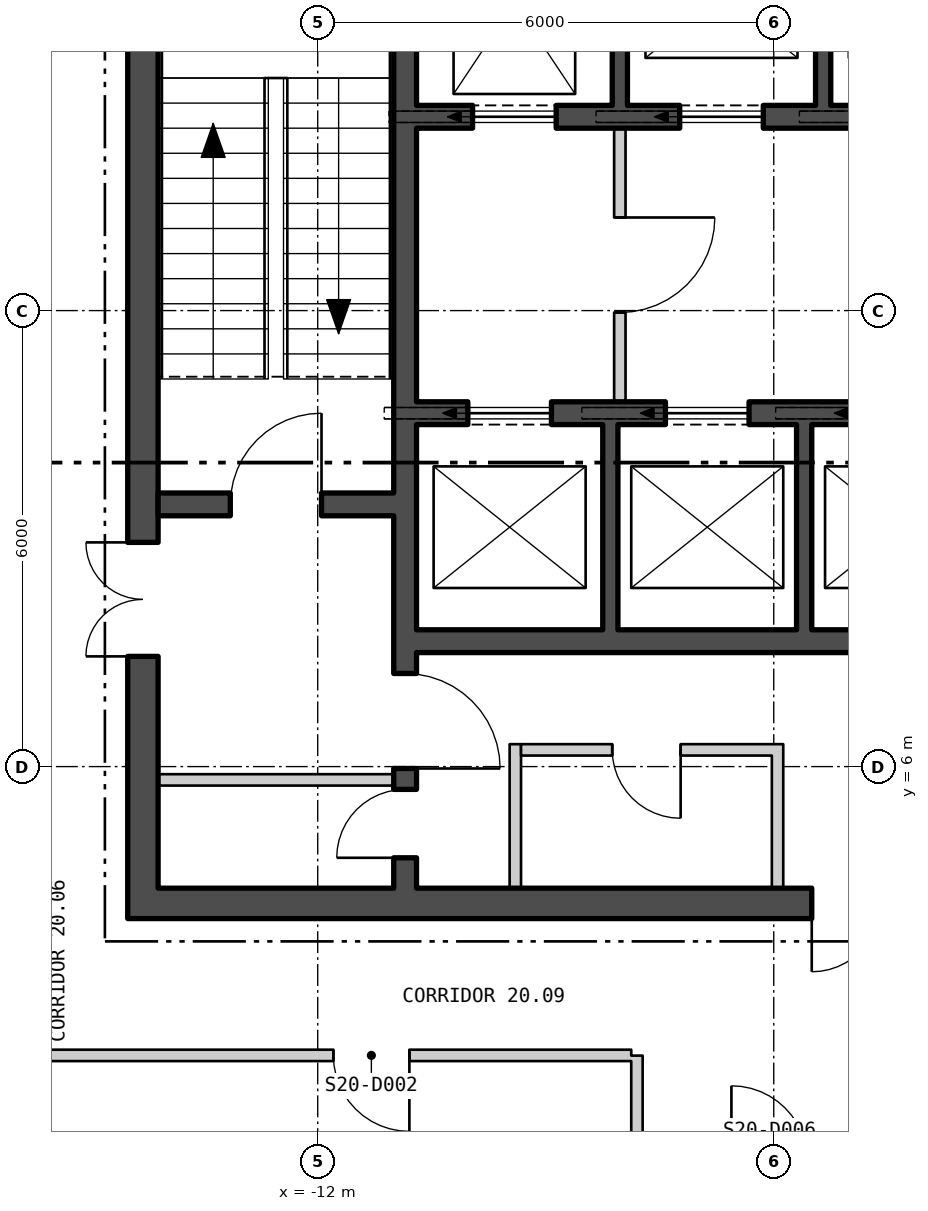
"""IFC4 building model, lengths in metres.
Left out: names, types, materials, properties, quantities, classifications, styles, units other than length and angle.
Written with IfcOpenShell. Run it as: python <this file> out.ifc"""

import sys

from ifc_helpers import new_model, si_unit, direction, frame, frame_2d, origin, place, context, subcontext, project, spatial, polyline, rectangle, outline, extrude, element, fill, save


model = new_model("IFC4")
c1 = context("Model", 3, precision=1e-05, world=origin(), true_north=direction((0.0, 1.0)))
c2 = subcontext(c1, "Body", "Model", "MODEL_VIEW")
j1 = project(units=[si_unit("LENGTHUNIT", "METRE"), si_unit("PLANEANGLEUNIT", "RADIAN")], contexts=[c1])
p1 = place(None, origin())
s1 = spatial("IfcSite", under=j1, at=p1, CompositionType="ELEMENT")
p2 = place(p1, origin())
s2 = spatial("IfcBuilding", under=s1, at=p2, CompositionType="ELEMENT")
p3 = place(p2, frame((0.0, 0.0, 268.8)))
s3 = spatial("IfcBuildingStorey", under=s2, at=p3, CompositionType="ELEMENT", Elevation=268.8)
p4 = place(p3, frame((-25.54, 15.35, -0.18), z_axis=(0.0, 0.0, 1.0), x_axis=(0.499999764979, -0.866025539474, 0.0)))
e1 = element("IfcWall", 1, at=p4, inside=s3, PredefinedType="SOLIDWALL", context=c2, shape_type="SweptSolid", body=[
    extrude(outline(polyline([(-0.13, -0.225), (45.87, -0.225), (45.61, 0.225), (0.13, 0.225), (-0.13, -0.225)])), origin(), (0.0, 0.0, 1.0), 3.68),
])
p5 = place(p4, frame((1.424, 0.0, 1.08)))
e2 = element("IfcOpeningElement", 2, at=p5, cuts=e1, PredefinedType="OPENING", context=c2, shape_type="SweptSolid", body=[
    extrude(rectangle(XDim=2.4, YDim=2.0, at=frame_2d((1.2, 1.0))), frame((0.0, 0.235, 0.0), z_axis=(0.0, -1.0, 0.0), x_axis=(1.0, 0.0, 0.0)), (0.0, 0.0, 1.0), 0.47),
])
p6 = place(p4, frame((5.893, 0.0, 1.08)))
e3 = element("IfcOpeningElement", 3, at=p6, cuts=e1, PredefinedType="OPENING", context=c2, shape_type="SweptSolid", body=[
    extrude(rectangle(XDim=2.4, YDim=2.0, at=frame_2d((1.2, 1.0))), frame((0.0, 0.235, 0.0), z_axis=(0.0, -1.0, 0.0), x_axis=(1.0, 0.0, 0.0)), (0.0, 0.0, 1.0), 0.47),
])
p7 = place(p4, frame((10.401, 0.0, 1.08)))
e4 = element("IfcOpeningElement", 4, at=p7, cuts=e1, PredefinedType="OPENING", context=c2, shape_type="SweptSolid", body=[
    extrude(rectangle(XDim=2.4, YDim=2.0, at=frame_2d((1.2, 1.0))), frame((0.0, 0.235, 0.0), z_axis=(0.0, -1.0, 0.0), x_axis=(1.0, 0.0, 0.0)), (0.0, 0.0, 1.0), 0.47),
])
p8 = place(p4, frame((14.909, 0.0, 1.08)))
e5 = element("IfcOpeningElement", 5, at=p8, cuts=e1, PredefinedType="OPENING", context=c2, shape_type="SweptSolid", body=[
    extrude(rectangle(XDim=2.4, YDim=2.0, at=frame_2d((1.2, 1.0))), frame((0.0, 0.235, 0.0), z_axis=(0.0, -1.0, 0.0), x_axis=(1.0, 0.0, 0.0)), (0.0, 0.0, 1.0), 0.47),
])
p9 = place(p4, frame((19.416, 0.0, 1.08)))
e6 = element("IfcOpeningElement", 6, at=p9, cuts=e1, PredefinedType="OPENING", context=c2, shape_type="SweptSolid", body=[
    extrude(rectangle(XDim=2.4, YDim=2.0, at=frame_2d((1.2, 1.0))), frame((0.0, 0.235, 0.0), z_axis=(0.0, -1.0, 0.0), x_axis=(1.0, 0.0, 0.0)), (0.0, 0.0, 1.0), 0.47),
])
p10 = place(p4, frame((23.924, 0.0, 1.08)))
e7 = element("IfcOpeningElement", 7, at=p10, cuts=e1, PredefinedType="OPENING", context=c2, shape_type="SweptSolid", body=[
    extrude(rectangle(XDim=2.4, YDim=2.0, at=frame_2d((1.2, 1.0))), frame((0.0, 0.235, 0.0), z_axis=(0.0, -1.0, 0.0), x_axis=(1.0, 0.0, 0.0)), (0.0, 0.0, 1.0), 0.47),
])
p11 = place(p4, frame((28.431, 0.0, 1.08)))
e8 = element("IfcOpeningElement", 8, at=p11, cuts=e1, PredefinedType="OPENING", context=c2, shape_type="SweptSolid", body=[
    extrude(rectangle(XDim=2.4, YDim=2.0, at=frame_2d((1.2, 1.0))), frame((0.0, 0.235, 0.0), z_axis=(0.0, -1.0, 0.0), x_axis=(1.0, 0.0, 0.0)), (0.0, 0.0, 1.0), 0.47),
])
p12 = place(p4, frame((32.939, 0.0, 1.08)))
e9 = element("IfcOpeningElement", 9, at=p12, cuts=e1, PredefinedType="OPENING", context=c2, shape_type="SweptSolid", body=[
    extrude(rectangle(XDim=2.4, YDim=2.0, at=frame_2d((1.2, 1.0))), frame((0.0, 0.235, 0.0), z_axis=(0.0, -1.0, 0.0), x_axis=(1.0, 0.0, 0.0)), (0.0, 0.0, 1.0), 0.47),
])
p13 = place(p4, frame((37.447, 0.0, 1.08)))
e10 = element("IfcOpeningElement", 10, at=p13, cuts=e1, PredefinedType="OPENING", context=c2, shape_type="SweptSolid", body=[
    extrude(rectangle(XDim=2.4, YDim=2.0, at=frame_2d((1.2, 1.0))), frame((0.0, 0.235, 0.0), z_axis=(0.0, -1.0, 0.0), x_axis=(1.0, 0.0, 0.0)), (0.0, 0.0, 1.0), 0.47),
])
p14 = place(p4, frame((41.916, 0.0, 1.08)))
e11 = element("IfcOpeningElement", 11, at=p14, cuts=e1, PredefinedType="OPENING", context=c2, shape_type="SweptSolid", body=[
    extrude(rectangle(XDim=2.4, YDim=2.0, at=frame_2d((1.2, 1.0))), frame((0.0, 0.235, 0.0), z_axis=(0.0, -1.0, 0.0), x_axis=(1.0, 0.0, 0.0)), (0.0, 0.0, 1.0), 0.47),
])
p15 = place(p3, frame((-14.5, 4.2, 0.0), z_axis=(0.0, 0.0, 1.0), x_axis=(1.0, 0.0, 0.0)))
e12 = element("IfcWall", 12, at=p15, inside=s3, PredefinedType="SHEAR", context=c2, shape_type="SweptSolid", body=[
    extrude(rectangle(XDim=29.0, YDim=0.4, at=frame_2d((14.5, 0.0))), origin(), (0.0, 0.0, 1.0), 3.7),
])
p16 = place(p15, frame((9.0, 0.0, 0.0)))
e13 = element("IfcOpeningElement", 13, at=p16, cuts=e12, PredefinedType="OPENING", context=c2, shape_type="SweptSolid", body=[
    extrude(rectangle(XDim=1.8, YDim=2.4, at=frame_2d((0.9, 1.2))), frame((0.0, 0.21, 0.0), z_axis=(0.0, -1.0, 0.0), x_axis=(1.0, 0.0, 0.0)), (0.0, 0.0, 1.0), 0.42),
])
p17 = place(p15, frame((19.0, 0.0, 0.0)))
e14 = element("IfcOpeningElement", 14, at=p17, cuts=e12, PredefinedType="OPENING", context=c2, shape_type="SweptSolid", body=[
    extrude(rectangle(XDim=1.8, YDim=2.4, at=frame_2d((0.9, 1.2))), frame((0.0, 0.21, 0.0), z_axis=(0.0, -1.0, 0.0), x_axis=(1.0, 0.0, 0.0)), (0.0, 0.0, 1.0), 0.42),
])
p18 = place(p3, frame((-14.3, 4.4, 0.0), z_axis=(0.0, 0.0, 1.0), x_axis=(0.0, 1.0, 0.0)))
e15 = element("IfcWall", 15, at=p18, inside=s3, PredefinedType="SHEAR", context=c2, shape_type="SweptSolid", body=[
    extrude(rectangle(XDim=13.2, YDim=0.4, at=frame_2d((6.6, 0.0))), origin(), (0.0, 0.0, 1.0), 3.7),
])
p19 = place(p18, frame((3.05, 0.0, 0.0)))
e16 = element("IfcOpeningElement", 16, at=p19, cuts=e15, PredefinedType="OPENING", context=c2, shape_type="SweptSolid", body=[
    extrude(rectangle(XDim=1.5, YDim=2.1, at=frame_2d((0.75, 1.05))), frame((0.0, 0.21, 0.0), z_axis=(0.0, -1.0, 0.0), x_axis=(1.0, 0.0, 0.0)), (0.0, 0.0, 1.0), 0.42),
])
p20 = place(p3, frame((-10.85, 4.4, 0.0), z_axis=(0.0, 0.0, 1.0), x_axis=(0.0, 1.0, 0.0)))
e17 = element("IfcWall", 17, at=p20, inside=s3, PredefinedType="SHEAR", context=c2, shape_type="SweptSolid", body=[
    extrude(rectangle(XDim=13.2, YDim=0.3, at=frame_2d((6.6, 0.0))), origin(), (0.0, 0.0, 1.0), 3.7),
])
p21 = place(p20, frame((1.575, 0.0, 0.0)))
e18 = element("IfcOpeningElement", 18, at=p21, cuts=e17, PredefinedType="OPENING", context=c2, shape_type="SweptSolid", body=[
    extrude(rectangle(XDim=1.25, YDim=2.1, at=frame_2d((0.625, 1.05))), frame((0.0, 0.16, 0.0), z_axis=(0.0, -1.0, 0.0), x_axis=(1.0, 0.0, 0.0)), (0.0, 0.0, 1.0), 0.32),
])
p22 = place(p20, frame((0.4, 0.0, 0.0)))
e19 = element("IfcOpeningElement", 19, at=p22, cuts=e17, PredefinedType="OPENING", context=c2, shape_type="SweptSolid", body=[
    extrude(rectangle(XDim=0.9, YDim=2.1, at=frame_2d((0.45, 1.05))), frame((0.0, 0.16, 0.0), z_axis=(0.0, -1.0, 0.0), x_axis=(1.0, 0.0, 0.0)), (0.0, 0.0, 1.0), 0.32),
])
p23 = place(p3, frame((-14.1, 9.45, 0.0), z_axis=(0.0, 0.0, 1.0), x_axis=(1.0, 0.0, 0.0)))
e20 = element("IfcWall", 20, at=p23, inside=s3, PredefinedType="SHEAR", context=c2, shape_type="SweptSolid", body=[
    extrude(rectangle(XDim=3.1, YDim=0.3, at=frame_2d((1.55, 0.0))), origin(), (0.0, 0.0, 1.0), 3.7),
])
p24 = place(p23, frame((0.95, 0.0, 0.0)))
e21 = element("IfcOpeningElement", 21, at=p24, cuts=e20, PredefinedType="OPENING", context=c2, shape_type="SweptSolid", body=[
    extrude(rectangle(XDim=1.2, YDim=2.1, at=frame_2d((0.6, 1.05))), frame((0.0, 0.16, 0.0), z_axis=(0.0, -1.0, 0.0), x_axis=(1.0, 0.0, 0.0)), (0.0, 0.0, 1.0), 0.32),
])
p25 = place(p3, frame((-10.7, 14.55, 0.0), z_axis=(0.0, 0.0, 1.0), x_axis=(1.0, 0.0, 0.0)))
e22 = element("IfcWall", 22, at=p25, inside=s3, PredefinedType="SHEAR", context=c2, shape_type="SweptSolid", body=[
    extrude(rectangle(XDim=21.4, YDim=0.3, at=frame_2d((10.7, 0.0))), origin(), (0.0, 0.0, 1.0), 3.7),
])
p26 = place(p25, frame((0.738, 0.0, 0.0)))
e23 = element("IfcOpeningElement", 23, at=p26, cuts=e22, PredefinedType="OPENING", context=c2, shape_type="SweptSolid", body=[
    extrude(rectangle(XDim=1.1, YDim=2.1, at=frame_2d((0.55, 1.05))), frame((0.0, 0.16, 0.0), z_axis=(0.0, -1.0, 0.0), x_axis=(1.0, 0.0, 0.0)), (0.0, 0.0, 1.0), 0.32),
])
p27 = place(p25, frame((3.462, 0.0, 0.0)))
e24 = element("IfcOpeningElement", 24, at=p27, cuts=e22, PredefinedType="OPENING", context=c2, shape_type="SweptSolid", body=[
    extrude(rectangle(XDim=1.1, YDim=2.1, at=frame_2d((0.55, 1.05))), frame((0.0, 0.16, 0.0), z_axis=(0.0, -1.0, 0.0), x_axis=(1.0, 0.0, 0.0)), (0.0, 0.0, 1.0), 0.32),
])
p28 = place(p25, frame((6.138, 0.0, 0.0)))
e25 = element("IfcOpeningElement", 25, at=p28, cuts=e22, PredefinedType="OPENING", context=c2, shape_type="SweptSolid", body=[
    extrude(rectangle(XDim=1.1, YDim=2.1, at=frame_2d((0.55, 1.05))), frame((0.0, 0.16, 0.0), z_axis=(0.0, -1.0, 0.0), x_axis=(1.0, 0.0, 0.0)), (0.0, 0.0, 1.0), 0.32),
])
p29 = place(p25, frame((8.812, 0.0, 0.0)))
e26 = element("IfcOpeningElement", 26, at=p29, cuts=e22, PredefinedType="OPENING", context=c2, shape_type="SweptSolid", body=[
    extrude(rectangle(XDim=1.1, YDim=2.1, at=frame_2d((0.55, 1.05))), frame((0.0, 0.16, 0.0), z_axis=(0.0, -1.0, 0.0), x_axis=(1.0, 0.0, 0.0)), (0.0, 0.0, 1.0), 0.32),
])
p30 = place(p25, frame((19.562, 0.0, 0.0)))
e27 = element("IfcOpeningElement", 27, at=p30, cuts=e22, PredefinedType="OPENING", context=c2, shape_type="SweptSolid", body=[
    extrude(rectangle(XDim=1.1, YDim=2.1, at=frame_2d((0.55, 1.05))), frame((0.0, 0.16, 0.0), z_axis=(0.0, -1.0, 0.0), x_axis=(1.0, 0.0, 0.0)), (0.0, 0.0, 1.0), 0.32),
])
p31 = place(p25, frame((14.213, 0.0, 0.0)))
e28 = element("IfcOpeningElement", 28, at=p31, cuts=e22, PredefinedType="OPENING", context=c2, shape_type="SweptSolid", body=[
    extrude(rectangle(XDim=1.0, YDim=2.1, at=frame_2d((0.5, 1.05))), frame((0.0, 0.16, 0.0), z_axis=(0.0, -1.0, 0.0), x_axis=(1.0, 0.0, 0.0)), (0.0, 0.0, 1.0), 0.32),
])
p32 = place(p3, frame((-10.7, 10.65, 0.0), z_axis=(0.0, 0.0, 1.0), x_axis=(1.0, 0.0, 0.0)))
e29 = element("IfcWall", 29, at=p32, inside=s3, PredefinedType="SHEAR", context=c2, shape_type="SweptSolid", body=[
    extrude(rectangle(XDim=10.3, YDim=0.3, at=frame_2d((5.15, 0.0))), origin(), (0.0, 0.0, 1.0), 3.7),
])
p33 = place(p32, frame((0.675, 0.0, 0.0)))
e30 = element("IfcOpeningElement", 30, at=p33, cuts=e29, PredefinedType="OPENING", context=c2, shape_type="SweptSolid", body=[
    extrude(rectangle(XDim=1.1, YDim=2.1, at=frame_2d((0.55, 1.05))), frame((0.0, 0.16, 0.0), z_axis=(0.0, -1.0, 0.0), x_axis=(1.0, 0.0, 0.0)), (0.0, 0.0, 1.0), 0.32),
])
p34 = place(p32, frame((3.275, 0.0, 0.0)))
e31 = element("IfcOpeningElement", 31, at=p34, cuts=e29, PredefinedType="OPENING", context=c2, shape_type="SweptSolid", body=[
    extrude(rectangle(XDim=1.1, YDim=2.1, at=frame_2d((0.55, 1.05))), frame((0.0, 0.16, 0.0), z_axis=(0.0, -1.0, 0.0), x_axis=(1.0, 0.0, 0.0)), (0.0, 0.0, 1.0), 0.32),
])
p35 = place(p32, frame((5.825, 0.0, 0.0)))
e32 = element("IfcOpeningElement", 32, at=p35, cuts=e29, PredefinedType="OPENING", context=c2, shape_type="SweptSolid", body=[
    extrude(rectangle(XDim=1.1, YDim=2.1, at=frame_2d((0.55, 1.05))), frame((0.0, 0.16, 0.0), z_axis=(0.0, -1.0, 0.0), x_axis=(1.0, 0.0, 0.0)), (0.0, 0.0, 1.0), 0.32),
])
p36 = place(p32, frame((8.425, 0.0, 0.0)))
e33 = element("IfcOpeningElement", 33, at=p36, cuts=e29, PredefinedType="OPENING", context=c2, shape_type="SweptSolid", body=[
    extrude(rectangle(XDim=1.0, YDim=2.1, at=frame_2d((0.5, 1.05))), frame((0.0, 0.16, 0.0), z_axis=(0.0, -1.0, 0.0), x_axis=(1.0, 0.0, 0.0)), (0.0, 0.0, 1.0), 0.32),
])
p37 = place(p3, frame((-10.7, 7.65, 0.0), z_axis=(0.0, 0.0, 1.0), x_axis=(1.0, 0.0, 0.0)))
e34 = element("IfcWall", 34, at=p37, inside=s3, PredefinedType="SHEAR", context=c2, shape_type="SweptSolid", body=[
    extrude(rectangle(XDim=10.3, YDim=0.3, at=frame_2d((5.15, 0.0))), origin(), (0.0, 0.0, 1.0), 3.7),
])
for number, where, z_axis, x_axis in (
    (35, (-8.025, 14.7, 0.0), (0.0, 0.0, 1.0), (0.0, 1.0, 0.0)),
    (36, (-5.35, 14.7, 0.0), (0.0, 0.0, 1.0), (0.0, 1.0, 0.0)),
):
    element("IfcWall", number, at=place(p3, frame(where, z_axis=z_axis, x_axis=x_axis)), inside=s3, PredefinedType="SHEAR", context=c2, shape_type="SweptSolid", body=[
        extrude(rectangle(XDim=2.9, YDim=0.2, at=frame_2d((1.45, 0.0))), origin(), (0.0, 0.0, 1.0), 3.7),
    ])
for number, where, z_axis, x_axis in (
    (37, (-8.15, 7.8, 0.0), (0.0, 0.0, 1.0), (0.0, 1.0, 0.0)),
    (38, (-5.6, 7.8, 0.0), (0.0, 0.0, 1.0), (0.0, 1.0, 0.0)),
):
    element("IfcWall", number, at=place(p3, frame(where, z_axis=z_axis, x_axis=x_axis)), inside=s3, PredefinedType="SHEAR", context=c2, shape_type="SweptSolid", body=[
        extrude(rectangle(XDim=2.7, YDim=0.2, at=frame_2d((1.35, 0.0))), origin(), (0.0, 0.0, 1.0), 3.7),
    ])
p38 = place(p3, frame((-8.025, 10.8, 0.0), z_axis=(0.0, 0.0, 1.0), x_axis=(0.0, 1.0, 0.0)))
e39 = element("IfcWall", 39, at=p38, inside=s3, PredefinedType="PARTITIONING", context=c2, shape_type="SweptSolid", body=[
    extrude(rectangle(XDim=3.6, YDim=0.15, at=frame_2d((1.8, 0.0))), origin(), (0.0, 0.0, 1.0), 3.7),
])
p39 = place(p38, frame((1.175, 0.0, 0.0)))
e40 = element("IfcOpeningElement", 40, at=p39, cuts=e39, PredefinedType="OPENING", context=c2, shape_type="SweptSolid", body=[
    extrude(rectangle(XDim=1.25, YDim=2.1, at=frame_2d((0.625, 1.05))), frame((0.0, 0.085, 0.0), z_axis=(0.0, -1.0, 0.0), x_axis=(1.0, 0.0, 0.0)), (0.0, 0.0, 1.0), 0.17),
])
p40 = place(p3, frame((-14.1, 5.825, 0.0), z_axis=(0.0, 0.0, 1.0), x_axis=(1.0, 0.0, 0.0)))
e41 = element("IfcWall", 41, at=p40, inside=s3, PredefinedType="PARTITIONING", context=c2, shape_type="SweptSolid", body=[
    extrude(rectangle(XDim=3.1, YDim=0.15, at=frame_2d((1.55, 0.0))), origin(), (0.0, 0.0, 1.0), 3.7),
])
for number, where, z_axis, x_axis in (
    (42, (-9.4, 4.4, 0.0), (0.0, 0.0, 1.0), (0.0, 1.0, 0.0)),
    (43, (-5.95, 4.4, 0.0), (0.0, 0.0, 1.0), (0.0, 1.0, 0.0)),
):
    element("IfcWall", number, at=place(p3, frame(where, z_axis=z_axis, x_axis=x_axis)), inside=s3, PredefinedType="PARTITIONING", context=c2, shape_type="SweptSolid", body=[
        extrude(rectangle(XDim=1.895, YDim=0.15, at=frame_2d((0.948, 0.0))), origin(), (0.0, 0.0, 1.0), 3.7),
    ])
p41 = place(p3, frame((-9.325, 6.22, 0.0), z_axis=(0.0, 0.0, 1.0), x_axis=(1.0, 0.0, 0.0)))
e44 = element("IfcWall", 44, at=p41, inside=s3, PredefinedType="PARTITIONING", context=c2, shape_type="SweptSolid", body=[
    extrude(rectangle(XDim=3.3, YDim=0.15, at=frame_2d((1.65, 0.0))), origin(), (0.0, 0.0, 1.0), 3.7),
])
p42 = place(p41, frame((1.2, 0.0, 0.0)))
e45 = element("IfcOpeningElement", 45, at=p42, cuts=e44, PredefinedType="OPENING", context=c2, shape_type="SweptSolid", body=[
    extrude(rectangle(XDim=0.9, YDim=2.1, at=frame_2d((0.45, 1.05))), frame((0.0, 0.085, 0.0), z_axis=(0.0, -1.0, 0.0), x_axis=(1.0, 0.0, 0.0)), (0.0, 0.0, 1.0), 0.17),
])
p43 = place(p3, frame((-16.225, 2.2, 0.0), z_axis=(0.0, 0.0, 1.0), x_axis=(1.0, 0.0, 0.0)))
e46 = element("IfcWall", 46, at=p43, inside=s3, PredefinedType="PARTITIONING", context=c2, shape_type="SweptSolid", body=[
    extrude(rectangle(XDim=8.35, YDim=0.15, at=frame_2d((4.175, 0.0))), origin(), (0.0, 0.0, 1.0), 3.7),
])
p44 = place(p43, frame((4.431, 0.0, 0.0)))
e47 = element("IfcOpeningElement", 47, at=p44, cuts=e46, PredefinedType="OPENING", context=c2, shape_type="SweptSolid", body=[
    extrude(rectangle(XDim=1.0, YDim=2.1, at=frame_2d((0.5, 1.05))), frame((0.0, 0.085, 0.0), z_axis=(0.0, -1.0, 0.0), x_axis=(1.0, 0.0, 0.0)), (0.0, 0.0, 1.0), 0.17),
])
p45 = place(p3, frame((-7.8, -13.675, 0.0), z_axis=(0.0, 0.0, 1.0), x_axis=(0.0, 1.0, 0.0)))
e48 = element("IfcWall", 48, at=p45, inside=s3, PredefinedType="PARTITIONING", context=c2, shape_type="SweptSolid", body=[
    extrude(rectangle(XDim=15.872, YDim=0.15, at=frame_2d((7.936, 0.0))), origin(), (0.0, 0.0, 1.0), 3.7),
])
p46 = place(p45, frame((3.213, 0.0, 0.0)))
e49 = element("IfcOpeningElement", 49, at=p46, cuts=e48, PredefinedType="OPENING", context=c2, shape_type="SweptSolid", body=[
    extrude(rectangle(XDim=1.0, YDim=2.1, at=frame_2d((0.5, 1.05))), frame((0.0, 0.085, 0.0), z_axis=(0.0, -1.0, 0.0), x_axis=(1.0, 0.0, 0.0)), (0.0, 0.0, 1.0), 0.17),
])
p47 = place(p26, origin())
e50 = element("IfcDoor", 50, at=p47, inside=s3, OperationType="SLIDING_TO_LEFT", PredefinedType="DOOR", context=c2, shape_type="SweptSolid", body=[
    extrude(rectangle(XDim=1.1, YDim=2.1, at=frame_2d((0.55, 1.05))), frame((0.0, 0.025, 0.0), z_axis=(0.0, -1.0, 0.0), x_axis=(1.0, 0.0, 0.0)), (0.0, 0.0, 1.0), 0.05),
])
fill(e23, e50)
p48 = place(p27, origin())
e51 = element("IfcDoor", 51, at=p48, inside=s3, OperationType="SLIDING_TO_LEFT", PredefinedType="DOOR", context=c2, shape_type="SweptSolid", body=[
    extrude(rectangle(XDim=1.1, YDim=2.1, at=frame_2d((0.55, 1.05))), frame((0.0, 0.025, 0.0), z_axis=(0.0, -1.0, 0.0), x_axis=(1.0, 0.0, 0.0)), (0.0, 0.0, 1.0), 0.05),
])
fill(e24, e51)
p49 = place(p33, origin())
e52 = element("IfcDoor", 52, at=p49, inside=s3, OperationType="SLIDING_TO_LEFT", PredefinedType="DOOR", context=c2, shape_type="SweptSolid", body=[
    extrude(rectangle(XDim=1.1, YDim=2.1, at=frame_2d((0.55, 1.05))), frame((0.0, 0.025, 0.0), z_axis=(0.0, -1.0, 0.0), x_axis=(1.0, 0.0, 0.0)), (0.0, 0.0, 1.0), 0.05),
])
fill(e30, e52)
p50 = place(p34, origin())
e53 = element("IfcDoor", 53, at=p50, inside=s3, OperationType="SLIDING_TO_LEFT", PredefinedType="DOOR", context=c2, shape_type="SweptSolid", body=[
    extrude(rectangle(XDim=1.1, YDim=2.1, at=frame_2d((0.55, 1.05))), frame((0.0, 0.025, 0.0), z_axis=(0.0, -1.0, 0.0), x_axis=(1.0, 0.0, 0.0)), (0.0, 0.0, 1.0), 0.05),
])
fill(e31, e53)
p51 = place(p39, origin())
e54 = element("IfcDoor", 54, at=p51, inside=s3, OperationType="SINGLE_SWING_RIGHT", PredefinedType="DOOR", context=c2, shape_type="SweptSolid", body=[
    extrude(rectangle(XDim=1.25, YDim=2.1, at=frame_2d((0.625, 1.05))), frame((0.0, 0.025, 0.0), z_axis=(0.0, -1.0, 0.0), x_axis=(1.0, 0.0, 0.0)), (0.0, 0.0, 1.0), 0.05),
])
fill(e40, e54)
p52 = place(p24, origin())
e55 = element("IfcDoor", 55, at=p52, inside=s3, OperationType="SINGLE_SWING_LEFT", PredefinedType="DOOR", context=c2, shape_type="SweptSolid", body=[
    extrude(rectangle(XDim=1.2, YDim=2.1, at=frame_2d((0.6, 1.05))), frame((0.0, 0.025, 0.0), z_axis=(0.0, -1.0, 0.0), x_axis=(1.0, 0.0, 0.0)), (0.0, 0.0, 1.0), 0.05),
])
fill(e21, e55)
p53 = place(p21, origin())
e56 = element("IfcDoor", 56, at=p53, inside=s3, OperationType="SINGLE_SWING_LEFT", PredefinedType="DOOR", context=c2, shape_type="SweptSolid", body=[
    extrude(rectangle(XDim=1.25, YDim=2.1, at=frame_2d((0.625, 1.05))), frame((0.0, 0.025, 0.0), z_axis=(0.0, -1.0, 0.0), x_axis=(1.0, 0.0, 0.0)), (0.0, 0.0, 1.0), 0.05),
])
fill(e18, e56)
p54 = place(p19, origin())
e57 = element("IfcDoor", 57, at=p54, inside=s3, OperationType="DOUBLE_DOOR_SINGLE_SWING", PredefinedType="DOOR", context=c2, shape_type="SweptSolid", body=[
    extrude(rectangle(XDim=1.5, YDim=2.1, at=frame_2d((0.75, 1.05))), frame((0.0, 0.025, 0.0), z_axis=(0.0, -1.0, 0.0), x_axis=(1.0, 0.0, 0.0)), (0.0, 0.0, 1.0), 0.05),
])
fill(e16, e57)
p55 = place(p22, origin())
e58 = element("IfcDoor", 58, at=p55, inside=s3, OperationType="SINGLE_SWING_RIGHT", PredefinedType="DOOR", context=c2, shape_type="SweptSolid", body=[
    extrude(rectangle(XDim=0.9, YDim=2.1, at=frame_2d((0.45, 1.05))), frame((0.0, 0.025, 0.0), z_axis=(0.0, -1.0, 0.0), x_axis=(1.0, 0.0, 0.0)), (0.0, 0.0, 1.0), 0.05),
])
fill(e19, e58)
p56 = place(p42, origin())
e59 = element("IfcDoor", 59, at=p56, inside=s3, OperationType="SINGLE_SWING_RIGHT", PredefinedType="DOOR", context=c2, shape_type="SweptSolid", body=[
    extrude(rectangle(XDim=0.9, YDim=2.1, at=frame_2d((0.45, 1.05))), frame((0.0, 0.025, 0.0), z_axis=(0.0, -1.0, 0.0), x_axis=(1.0, 0.0, 0.0)), (0.0, 0.0, 1.0), 0.05),
])
fill(e45, e59)
p57 = place(p16, origin())
e60 = element("IfcDoor", 60, at=p57, inside=s3, OperationType="DOUBLE_DOOR_SINGLE_SWING", PredefinedType="DOOR", context=c2, shape_type="SweptSolid", body=[
    extrude(rectangle(XDim=1.8, YDim=2.4, at=frame_2d((0.9, 1.2))), frame((0.0, 0.025, 0.0), z_axis=(0.0, -1.0, 0.0), x_axis=(1.0, 0.0, 0.0)), (0.0, 0.0, 1.0), 0.05),
])
fill(e13, e60)
p58 = place(p44, origin())
e61 = element("IfcDoor", 61, at=p58, inside=s3, OperationType="SINGLE_SWING_RIGHT", PredefinedType="DOOR", context=c2, shape_type="SweptSolid", body=[
    extrude(rectangle(XDim=1.0, YDim=2.1, at=frame_2d((0.5, 1.05))), frame((0.0, 0.025, 0.0), z_axis=(0.0, -1.0, 0.0), x_axis=(1.0, 0.0, 0.0)), (0.0, 0.0, 1.0), 0.05),
])
fill(e47, e61)
save(model, sys.argv[1])
